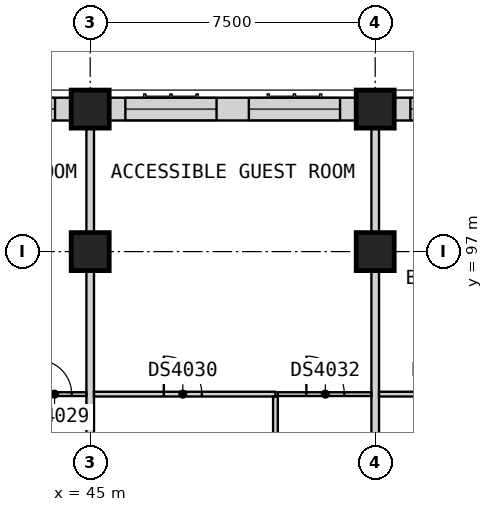
"""IFC4 building model, lengths in metres.
Left out: names, types, materials, properties, quantities, classifications, styles, units other than length and angle.
Written with IfcOpenShell. Run it as: python <this file> out.ifc"""

import sys

from ifc_helpers import new_model, si_unit, direction, frame, frame_2d, origin, origin_2d, place, context, subcontext, project, spatial, rectangle, extrude, element, fill, save


model = new_model("IFC4")
c1 = context("Model", 3, precision=1e-05, world=origin(), true_north=direction((0.0, 1.0)))
c2 = subcontext(c1, "Body", "Model", "MODEL_VIEW")
j1 = project(units=[si_unit("LENGTHUNIT", "METRE"), si_unit("PLANEANGLEUNIT", "RADIAN")], contexts=[c1])
p1 = place(None, origin())
s1 = spatial("IfcSite", under=j1, at=p1, CompositionType="ELEMENT")
p2 = place(p1, origin())
s2 = spatial("IfcBuilding", under=s1, at=p2, CompositionType="ELEMENT")
p3 = place(p2, frame((0.0, 0.0, 141.0)))
s3 = spatial("IfcBuildingStorey", under=s2, at=p3, CompositionType="ELEMENT", Elevation=141.0)
for number, where, z_axis, x_axis in (
    (1, (45.0, 100.75, 0.0), (0.0, 0.0, 1.0), (1.0, 0.0, 0.0)),
    (2, (52.5, 100.75, 0.0), (0.0, 0.0, 1.0), (1.0, 0.0, 0.0)),
    (3, (45.0, 97.0, 0.0), (0.0, 0.0, 1.0), (1.0, 0.0, 0.0)),
    (4, (52.5, 97.0, 0.0), (0.0, 0.0, 1.0), (1.0, 0.0, 0.0)),
):
    element("IfcColumn", number, at=place(p3, frame(where, z_axis=z_axis, x_axis=x_axis)), inside=s3, PredefinedType="COLUMN", context=c2, shape_type="SweptSolid", body=[
        extrude(rectangle(XDim=1.0, YDim=1.0, at=origin_2d()), origin(), (0.0, 0.0, 1.0), 3.6),
    ])
p4 = place(p3, frame((59.5, 100.75, 0.0), z_axis=(0.0, 0.0, 1.0), x_axis=(-1.0, 0.0, 0.0)))
e5 = element("IfcWall", 5, at=p4, inside=s3, PredefinedType="SOLIDWALL", context=c2, shape_type="SweptSolid", body=[
    extrude(rectangle(XDim=6.5, YDim=0.6, at=frame_2d((3.25, 0.0))), origin(), (0.0, 0.0, 1.0), 2.85),
])
p5 = place(p4, frame((3.675, 0.0, 0.8)))
e6 = element("IfcOpeningElement", 6, at=p5, cuts=e5, PredefinedType="OPENING", context=c2, shape_type="SweptSolid", body=[
    extrude(rectangle(XDim=2.4, YDim=1.8, at=frame_2d((1.2, 0.9))), frame((0.0, 0.31, 0.0), z_axis=(0.0, -1.0, 0.0), x_axis=(1.0, 0.0, 0.0)), (0.0, 0.0, 1.0), 0.62),
])
p6 = place(p4, frame((0.425, 0.0, 0.8)))
e7 = element("IfcOpeningElement", 7, at=p6, cuts=e5, PredefinedType="OPENING", context=c2, shape_type="SweptSolid", body=[
    extrude(rectangle(XDim=2.4, YDim=1.8, at=frame_2d((1.2, 0.9))), frame((0.0, 0.31, 0.0), z_axis=(0.0, -1.0, 0.0), x_axis=(1.0, 0.0, 0.0)), (0.0, 0.0, 1.0), 0.62),
])
p7 = place(p3, frame((52.0, 100.75, 0.0), z_axis=(0.0, 0.0, 1.0), x_axis=(-1.0, 0.0, 0.0)))
e8 = element("IfcWall", 8, at=p7, inside=s3, PredefinedType="SOLIDWALL", context=c2, shape_type="SweptSolid", body=[
    extrude(rectangle(XDim=6.5, YDim=0.6, at=frame_2d((3.25, 0.0))), origin(), (0.0, 0.0, 1.0), 2.85),
])
p8 = place(p7, frame((3.675, 0.0, 0.8)))
e9 = element("IfcOpeningElement", 9, at=p8, cuts=e8, PredefinedType="OPENING", context=c2, shape_type="SweptSolid", body=[
    extrude(rectangle(XDim=2.4, YDim=1.8, at=frame_2d((1.2, 0.9))), frame((0.0, 0.31, 0.0), z_axis=(0.0, -1.0, 0.0), x_axis=(1.0, 0.0, 0.0)), (0.0, 0.0, 1.0), 0.62),
])
p9 = place(p7, frame((0.425, 0.0, 0.8)))
e10 = element("IfcOpeningElement", 10, at=p9, cuts=e8, PredefinedType="OPENING", context=c2, shape_type="SweptSolid", body=[
    extrude(rectangle(XDim=2.4, YDim=1.8, at=frame_2d((1.2, 0.9))), frame((0.0, 0.31, 0.0), z_axis=(0.0, -1.0, 0.0), x_axis=(1.0, 0.0, 0.0)), (0.0, 0.0, 1.0), 0.62),
])
p10 = place(p3, frame((44.5, 100.75, 0.0), z_axis=(0.0, 0.0, 1.0), x_axis=(-1.0, 0.0, 0.0)))
e11 = element("IfcWall", 11, at=p10, inside=s3, PredefinedType="SOLIDWALL", context=c2, shape_type="SweptSolid", body=[
    extrude(rectangle(XDim=6.5, YDim=0.6, at=frame_2d((3.25, 0.0))), origin(), (0.0, 0.0, 1.0), 2.85),
])
p11 = place(p10, frame((3.675, 0.0, 0.8)))
e12 = element("IfcOpeningElement", 12, at=p11, cuts=e11, PredefinedType="OPENING", context=c2, shape_type="SweptSolid", body=[
    extrude(rectangle(XDim=2.4, YDim=1.8, at=frame_2d((1.2, 0.9))), frame((0.0, 0.31, 0.0), z_axis=(0.0, -1.0, 0.0), x_axis=(1.0, 0.0, 0.0)), (0.0, 0.0, 1.0), 0.62),
])
p12 = place(p10, frame((0.425, 0.0, 0.8)))
e13 = element("IfcOpeningElement", 13, at=p12, cuts=e11, PredefinedType="OPENING", context=c2, shape_type="SweptSolid", body=[
    extrude(rectangle(XDim=2.4, YDim=1.8, at=frame_2d((1.2, 0.9))), frame((0.0, 0.31, 0.0), z_axis=(0.0, -1.0, 0.0), x_axis=(1.0, 0.0, 0.0)), (0.0, 0.0, 1.0), 0.62),
])
for number, where, z_axis, x_axis in (
    (14, (45.0, 88.725, 0.0), (0.0, 0.0, 1.0), (0.0, 1.0, 0.0)),
    (15, (52.5, 88.725, 0.0), (0.0, 0.0, 1.0), (0.0, 1.0, 0.0)),
):
    element("IfcWall", number, at=place(p3, frame(where, z_axis=z_axis, x_axis=x_axis)), inside=s3, PredefinedType="PARTITIONING", context=c2, shape_type="SweptSolid", body=[
        extrude(rectangle(XDim=12.525, YDim=0.2, at=frame_2d((6.262, 0.0))), origin(), (0.0, 0.0, 1.0), 3.35),
    ])
p13 = place(p3, frame((43.188, 93.25, 0.0), z_axis=(0.0, 0.0, 1.0), x_axis=(1.0, 0.0, 0.0)))
e16 = element("IfcWall", 16, at=p13, inside=s3, PredefinedType="PARTITIONING", context=c2, shape_type="SweptSolid", body=[
    extrude(rectangle(XDim=1.712, YDim=0.1, at=frame_2d((0.856, 0.0))), origin(), (0.0, 0.0, 1.0), 3.35),
])
p14 = place(p13, frame((0.425, 0.0, 0.0)))
e17 = element("IfcOpeningElement", 17, at=p14, cuts=e16, PredefinedType="OPENING", context=c2, shape_type="SweptSolid", body=[
    extrude(rectangle(XDim=0.9, YDim=2.1, at=frame_2d((0.45, 1.05))), frame((0.0, 0.06, 0.0), z_axis=(0.0, -1.0, 0.0), x_axis=(1.0, 0.0, 0.0)), (0.0, 0.0, 1.0), 0.12),
])
p15 = place(p3, frame((49.938, 93.25, 0.0), z_axis=(0.0, 0.0, 1.0), x_axis=(1.0, 0.0, 0.0)))
e18 = element("IfcWall", 18, at=p15, inside=s3, PredefinedType="PARTITIONING", context=c2, shape_type="SweptSolid", body=[
    extrude(rectangle(XDim=2.462, YDim=0.1, at=frame_2d((1.231, 0.0))), origin(), (0.0, 0.0, 1.0), 3.35),
])
p16 = place(p15, frame((0.75, 0.0, 0.0)))
e19 = element("IfcOpeningElement", 19, at=p16, cuts=e18, PredefinedType="OPENING", context=c2, shape_type="SweptSolid", body=[
    extrude(rectangle(XDim=1.0, YDim=2.1, at=frame_2d((0.5, 1.05))), frame((0.0, 0.06, 0.0), z_axis=(0.0, -1.0, 0.0), x_axis=(1.0, 0.0, 0.0)), (0.0, 0.0, 1.0), 0.12),
])
p17 = place(p3, frame((45.1, 93.25, 0.0), z_axis=(0.0, 0.0, 1.0), x_axis=(1.0, 0.0, 0.0)))
e20 = element("IfcWall", 20, at=p17, inside=s3, PredefinedType="PARTITIONING", context=c2, shape_type="SweptSolid", body=[
    extrude(rectangle(XDim=4.775, YDim=0.125, at=frame_2d((2.387, 0.0))), origin(), (0.0, 0.0, 1.0), 3.35),
])
p18 = place(p17, frame((1.837, 0.0, 0.0)))
e21 = element("IfcOpeningElement", 21, at=p18, cuts=e20, PredefinedType="OPENING", context=c2, shape_type="SweptSolid", body=[
    extrude(rectangle(XDim=1.0, YDim=2.1, at=frame_2d((0.5, 1.05))), frame((0.0, 0.073, 0.0), z_axis=(0.0, -1.0, 0.0), x_axis=(1.0, 0.0, 0.0)), (0.0, 0.0, 1.0), 0.145),
])
p19 = place(p3, frame((52.6, 93.25, 0.0), z_axis=(0.0, 0.0, 1.0), x_axis=(1.0, 0.0, 0.0)))
e22 = element("IfcWall", 22, at=p19, inside=s3, PredefinedType="PARTITIONING", context=c2, shape_type="SweptSolid", body=[
    extrude(rectangle(XDim=3.65, YDim=0.125, at=frame_2d((1.825, 0.0))), origin(), (0.0, 0.0, 1.0), 3.35),
])
p20 = place(p19, frame((1.325, 0.0, 0.0)))
e23 = element("IfcOpeningElement", 23, at=p20, cuts=e22, PredefinedType="OPENING", context=c2, shape_type="SweptSolid", body=[
    extrude(rectangle(XDim=0.9, YDim=2.1, at=frame_2d((0.45, 1.05))), frame((0.0, 0.073, 0.0), z_axis=(0.0, -1.0, 0.0), x_axis=(1.0, 0.0, 0.0)), (0.0, 0.0, 1.0), 0.145),
])
p21 = place(p3, frame((49.875, 88.725, 0.0), z_axis=(0.0, 0.0, 1.0), x_axis=(0.0, 1.0, 0.0)))
e24 = element("IfcWall", 24, at=p21, inside=s3, PredefinedType="PARTITIONING", context=c2, shape_type="SweptSolid", body=[
    extrude(rectangle(XDim=4.462, YDim=0.125, at=frame_2d((2.231, 0.0))), origin(), (0.0, 0.0, 1.0), 3.35),
])
p22 = place(p5, origin())
e25 = element("IfcWindow", 25, at=p22, inside=s3, PartitioningType="SINGLE_PANEL", PredefinedType="WINDOW", context=c2, shape_type="SweptSolid", body=[
    extrude(rectangle(XDim=2.4, YDim=1.8, at=frame_2d((1.2, 0.9))), frame((0.0, -0.07, 0.0), z_axis=(0.0, -1.0, 0.0), x_axis=(1.0, 0.0, 0.0)), (0.0, 0.0, 1.0), 0.06),
])
fill(e6, e25)
p23 = place(p8, origin())
e26 = element("IfcWindow", 26, at=p23, inside=s3, PartitioningType="SINGLE_PANEL", PredefinedType="WINDOW", context=c2, shape_type="SweptSolid", body=[
    extrude(rectangle(XDim=2.4, YDim=1.8, at=frame_2d((1.2, 0.9))), frame((0.0, -0.07, 0.0), z_axis=(0.0, -1.0, 0.0), x_axis=(1.0, 0.0, 0.0)), (0.0, 0.0, 1.0), 0.06),
])
fill(e9, e26)
p24 = place(p9, origin())
e27 = element("IfcWindow", 27, at=p24, inside=s3, PartitioningType="SINGLE_PANEL", PredefinedType="WINDOW", context=c2, shape_type="SweptSolid", body=[
    extrude(rectangle(XDim=2.4, YDim=1.8, at=frame_2d((1.2, 0.9))), frame((0.0, -0.07, 0.0), z_axis=(0.0, -1.0, 0.0), x_axis=(1.0, 0.0, 0.0)), (0.0, 0.0, 1.0), 0.06),
])
fill(e10, e27)
p25 = place(p12, origin())
e28 = element("IfcWindow", 28, at=p25, inside=s3, PartitioningType="SINGLE_PANEL", PredefinedType="WINDOW", context=c2, shape_type="SweptSolid", body=[
    extrude(rectangle(XDim=2.4, YDim=1.8, at=frame_2d((1.2, 0.9))), frame((0.0, -0.07, 0.0), z_axis=(0.0, -1.0, 0.0), x_axis=(1.0, 0.0, 0.0)), (0.0, 0.0, 1.0), 0.06),
])
fill(e13, e28)
p26 = place(p14, origin())
e29 = element("IfcDoor", 29, at=p26, inside=s3, OperationType="SINGLE_SWING_RIGHT", PredefinedType="DOOR", context=c2, shape_type="SweptSolid", body=[
    extrude(rectangle(XDim=0.9, YDim=2.1, at=frame_2d((0.45, 1.05))), frame((0.0, 0.025, 0.0), z_axis=(0.0, -1.0, 0.0), x_axis=(1.0, 0.0, 0.0)), (0.0, 0.0, 1.0), 0.05),
])
fill(e17, e29)
p27 = place(p18, origin())
e30 = element("IfcDoor", 30, at=p27, inside=s3, OperationType="SINGLE_SWING_RIGHT", PredefinedType="DOOR", context=c2, shape_type="SweptSolid", body=[
    extrude(rectangle(XDim=1.0, YDim=2.1, at=frame_2d((0.5, 1.05))), frame((0.0, 0.025, 0.0), z_axis=(0.0, -1.0, 0.0), x_axis=(1.0, 0.0, 0.0)), (0.0, 0.0, 1.0), 0.05),
])
fill(e21, e30)
p28 = place(p16, origin())
e31 = element("IfcDoor", 31, at=p28, inside=s3, OperationType="SINGLE_SWING_RIGHT", PredefinedType="DOOR", context=c2, shape_type="SweptSolid", body=[
    extrude(rectangle(XDim=1.0, YDim=2.1, at=frame_2d((0.5, 1.05))), frame((0.0, 0.025, 0.0), z_axis=(0.0, -1.0, 0.0), x_axis=(1.0, 0.0, 0.0)), (0.0, 0.0, 1.0), 0.05),
])
fill(e19, e31)
save(model, sys.argv[1])
